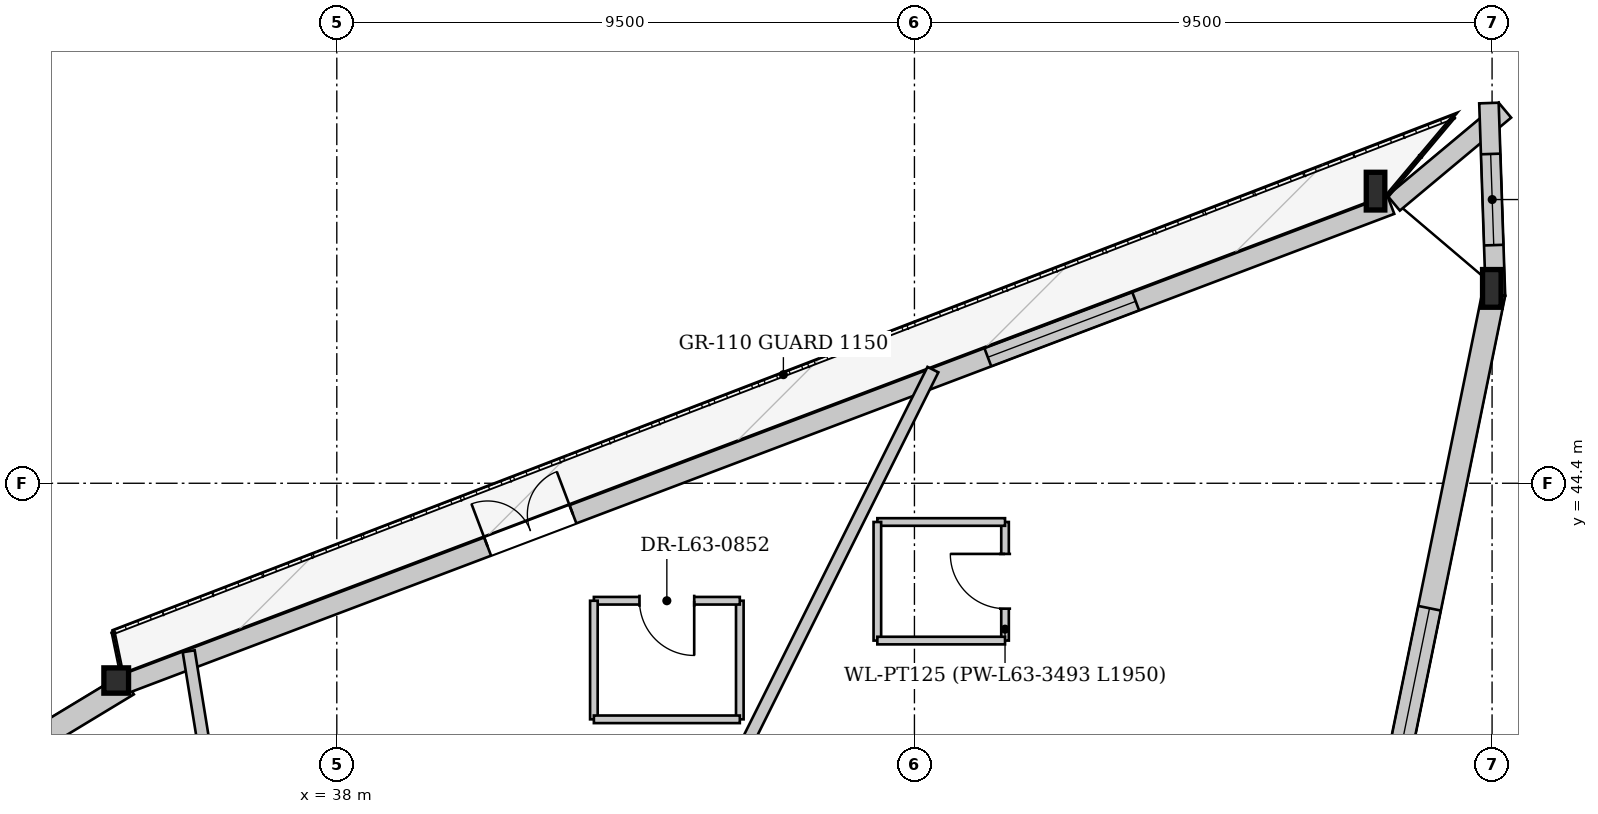
"""IFC4 building model, lengths in metres.
Left out: names, types, materials, properties, quantities, classifications, styles, units other than length and angle.
Written with IfcOpenShell. Run it as: python <this file> out.ifc"""

import sys

from ifc_helpers import new_model, si_unit, direction, frame, frame_2d, origin, origin_2d, place, context, subcontext, project, spatial, rectangle, i_section, extrude, source, transform, mapped, element, fill, save


model = new_model("IFC4")
c1 = context("Model", 3, precision=1e-05, world=origin(), true_north=direction((0.0, 1.0)))
c2 = subcontext(c1, "Body", "Model", "MODEL_VIEW")
j1 = project(units=[si_unit("LENGTHUNIT", "METRE"), si_unit("PLANEANGLEUNIT", "RADIAN")], contexts=[c1])
p1 = place(None, origin())
s1 = spatial("IfcSite", under=j1, at=p1, CompositionType="ELEMENT")
p2 = place(p1, origin())
s2 = spatial("IfcBuilding", under=s1, at=p2, CompositionType="ELEMENT")
p3 = place(p2, frame((0.0, 0.0, 238.1)))
s3 = spatial("IfcBuildingStorey", under=s2, at=p3, CompositionType="ELEMENT", Elevation=238.1)
m1 = source(origin(), c2, "Body", "SweptSolid", [
    extrude(i_section(OverallWidth=0.305, OverallDepth=0.62, WebThickness=0.021, FlangeThickness=0.04, at=origin_2d()), origin(), (0.0, 0.0, 1.0), 3.471),
])
p4 = place(p3, frame((57.216, 47.483, 0.0), z_axis=(-0.126666375705, 0.069768486785, 0.989488750577), x_axis=(-0.482460084866, -0.875917956495, 0.0)))
e1 = element("IfcColumn", 1, at=p4, inside=s3, PredefinedType="COLUMN", context=c2, shape_type="MappedRepresentation", body=[
    mapped(m1, transform((0.0, 0.0, 0.0), x_axis=(1.0, 0.0, 0.0), y_axis=(0.0, 1.0, 0.0), z_axis=(0.0, 0.0, 1.0), scale=1.0)),
])
m2 = source(origin(), c2, "Body", "SweptSolid", [
    extrude(i_section(OverallWidth=0.305, OverallDepth=0.62, WebThickness=0.021, FlangeThickness=0.04, at=origin_2d()), origin(), (0.0, 0.0, 1.0), 3.46),
])
p5 = place(p3, frame((55.278, 49.129, 0.0), z_axis=(-0.112543477187, 0.043112266183, 0.992711084983), x_axis=(-0.357723309734, -0.933827625246, 0.0)))
e2 = element("IfcColumn", 2, at=p5, inside=s3, PredefinedType="COLUMN", context=c2, shape_type="MappedRepresentation", body=[
    mapped(m2, transform((0.0, 0.0, 0.0), x_axis=(1.0, 0.0, 0.0), y_axis=(0.0, 1.0, 0.0), z_axis=(0.0, 0.0, 1.0), scale=1.0)),
])
m3 = source(origin(), c2, "Body", "SweptSolid", [
    extrude(i_section(OverallWidth=0.406, OverallDepth=0.416, WebThickness=0.027, FlangeThickness=0.042, at=origin_2d()), origin(), (0.0, 0.0, 1.0), 3.445),
])
p6 = place(p3, frame((34.465, 41.253, 0.0), z_axis=(-0.054066700831, -0.05647596404, 0.99693894364), x_axis=(0.722346539957, -0.691531254689, 0.0)))
e3 = element("IfcColumn", 3, at=p6, inside=s3, PredefinedType="COLUMN", context=c2, shape_type="MappedRepresentation", body=[
    mapped(m3, transform((0.0, 0.0, 0.0), x_axis=(1.0, 0.0, 0.0), y_axis=(0.0, 1.0, 0.0), z_axis=(0.0, 0.0, 1.0), scale=1.0)),
])
p7 = place(p3, frame((15.525, 29.57, 0.0), z_axis=(0.0, 0.0, 1.0), x_axis=(0.855554684799, 0.517712450418, 0.0)))
e4 = element("IfcWall", 4, at=p7, inside=s3, PredefinedType="SOLIDWALL", context=c2, shape_type="SweptSolid", body=[
    extrude(rectangle(XDim=22.253, YDim=0.38, at=frame_2d((11.126, 0.0))), origin(), (0.0, 0.0, 1.0), 2.872),
])
p8 = place(p7, frame((5.131, 0.0, 0.502)))
e5 = element("IfcOpeningElement", 5, at=p8, cuts=e4, PredefinedType="OPENING", context=c2, shape_type="SweptSolid", body=[
    extrude(rectangle(XDim=2.2, YDim=2.25, at=frame_2d((1.1, 1.125))), frame((0.0, 0.2, 0.0), z_axis=(0.0, -1.0, 0.0), x_axis=(1.0, 0.0, 0.0)), (0.0, 0.0, 1.0), 0.4),
])
p9 = place(p7, frame((14.922, 0.0, 0.502)))
e6 = element("IfcOpeningElement", 6, at=p9, cuts=e4, PredefinedType="OPENING", context=c2, shape_type="SweptSolid", body=[
    extrude(rectangle(XDim=2.2, YDim=2.25, at=frame_2d((1.1, 1.125))), frame((0.0, 0.2, 0.0), z_axis=(0.0, -1.0, 0.0), x_axis=(1.0, 0.0, 0.0)), (0.0, 0.0, 1.0), 0.4),
])
p10 = place(p3, frame((34.522, 41.104, 0.0), z_axis=(0.0, 0.0, 1.0), x_axis=(0.935273105542, 0.353926854095, 0.0)))
e7 = element("IfcWall", 7, at=p10, inside=s3, PredefinedType="SOLIDWALL", context=c2, shape_type="SweptSolid", body=[
    extrude(rectangle(XDim=22.253, YDim=0.32, at=frame_2d((11.126, 0.0))), origin(), (0.0, 0.0, 1.0), 2.872),
])
p11 = place(p10, frame((6.371, 0.0, 0.0)))
e8 = element("IfcOpeningElement", 8, at=p11, cuts=e7, PredefinedType="OPENING", context=c2, shape_type="SweptSolid", body=[
    extrude(rectangle(XDim=1.5, YDim=2.3, at=frame_2d((0.75, 1.15))), frame((0.0, 0.17, 0.0), z_axis=(0.0, -1.0, 0.0), x_axis=(1.0, 0.0, 0.0)), (0.0, 0.0, 1.0), 0.34),
])
p12 = place(p10, frame((15.167, 0.0, 0.402)))
e9 = element("IfcOpeningElement", 9, at=p12, cuts=e7, PredefinedType="OPENING", context=c2, shape_type="SweptSolid", body=[
    extrude(rectangle(XDim=2.6, YDim=2.35, at=frame_2d((1.3, 1.175))), frame((0.0, 0.17, 0.0), z_axis=(0.0, -1.0, 0.0), x_axis=(1.0, 0.0, 0.0)), (0.0, 0.0, 1.0), 0.34),
])
p13 = place(p3, frame((55.381, 49.007, 0.0), z_axis=(0.0, 0.0, 1.0), x_axis=(0.767448666807, 0.641110399086, 0.0)))
e10 = element("IfcWall", 10, at=p13, inside=s3, PredefinedType="SOLIDWALL", context=c2, shape_type="SweptSolid", body=[
    extrude(rectangle(XDim=2.385, YDim=0.32, at=frame_2d((1.192, 0.0))), origin(), (0.0, 0.0, 1.0), 2.872),
])
p14 = place(p3, frame((56.948, 50.653, 0.0), z_axis=(0.0, 0.0, 1.0), x_axis=(0.033816390911, -0.999428062296, 0.0)))
e11 = element("IfcWall", 11, at=p14, inside=s3, PredefinedType="SOLIDWALL", context=c2, shape_type="SweptSolid", body=[
    extrude(rectangle(XDim=3.177, YDim=0.32, at=frame_2d((1.588, 0.0))), origin(), (0.0, 0.0, 1.0), 2.872),
])
p15 = place(p14, frame((0.838, 0.0, 0.452)))
e12 = element("IfcOpeningElement", 12, at=p15, cuts=e11, PredefinedType="OPENING", context=c2, shape_type="SweptSolid", body=[
    extrude(rectangle(XDim=1.5, YDim=2.3, at=frame_2d((0.75, 1.15))), frame((0.0, 0.17, 0.0), z_axis=(0.0, -1.0, 0.0), x_axis=(1.0, 0.0, 0.0)), (0.0, 0.0, 1.0), 0.34),
])
p16 = place(p3, frame((57.03, 47.521, 0.0), z_axis=(0.0, 0.0, 1.0), x_axis=(-0.200236926918, -0.979747504768, 0.0)))
e13 = element("IfcWall", 13, at=p16, inside=s3, PredefinedType="SOLIDWALL", context=c2, shape_type="SweptSolid", body=[
    extrude(rectangle(XDim=22.8, YDim=0.38, at=frame_2d((11.4, 0.0))), origin(), (0.0, 0.0, 1.0), 2.872),
])
p17 = place(p16, frame((5.284, 0.0, 0.502)))
e14 = element("IfcOpeningElement", 14, at=p17, cuts=e13, PredefinedType="OPENING", context=c2, shape_type="SweptSolid", body=[
    extrude(rectangle(XDim=2.2, YDim=2.25, at=frame_2d((1.1, 1.125))), frame((0.0, 0.2, 0.0), z_axis=(0.0, -1.0, 0.0), x_axis=(1.0, 0.0, 0.0)), (0.0, 0.0, 1.0), 0.4),
])
p18 = place(p16, frame((15.316, 0.0, 0.502)))
e15 = element("IfcOpeningElement", 15, at=p18, cuts=e13, PredefinedType="OPENING", context=c2, shape_type="SweptSolid", body=[
    extrude(rectangle(XDim=2.2, YDim=2.25, at=frame_2d((1.1, 1.125))), frame((0.0, 0.2, 0.0), z_axis=(0.0, -1.0, 0.0), x_axis=(1.0, 0.0, 0.0)), (0.0, 0.0, 1.0), 0.4),
])
p19 = place(p3, frame((36.478, 36.0, 0.0), z_axis=(0.0, 0.0, 1.0), x_axis=(-0.159891020991, 0.987134672376, 0.0)))
e16 = element("IfcWall", 16, at=p19, inside=s3, PredefinedType="PARTITIONING", context=c2, shape_type="SweptSolid", body=[
    extrude(rectangle(XDim=5.711, YDim=0.2, at=frame_2d((2.855, 0.0))), origin(), (0.0, 0.0, 1.0), 3.38),
])
p20 = place(p3, frame((41.763, 34.15, 0.0), z_axis=(0.0, 0.0, 1.0), x_axis=(0.446117078005, 0.894974610094, 0.0)))
e17 = element("IfcWall", 17, at=p20, inside=s3, PredefinedType="PARTITIONING", context=c2, shape_type="SweptSolid", body=[
    extrude(rectangle(XDim=13.541, YDim=0.2, at=frame_2d((6.771, 0.0))), origin(), (0.0, 0.0, 1.0), 3.38),
])
p21 = place(p3, frame((48.99, 41.813, 0.0), z_axis=(0.0, 0.0, 1.0), x_axis=(0.0, 1.0, 0.0)))
e18 = element("IfcWall", 18, at=p21, inside=s3, PredefinedType="PARTITIONING", context=c2, shape_type="SweptSolid", body=[
    extrude(rectangle(XDim=1.95, YDim=0.125, at=frame_2d((0.975, 0.0))), origin(), (0.0, 0.0, 1.0), 3.38),
])
p22 = place(p21, frame((0.525, 0.0, 0.0)))
e19 = element("IfcOpeningElement", 19, at=p22, cuts=e18, PredefinedType="OPENING", context=c2, shape_type="SweptSolid", body=[
    extrude(rectangle(XDim=0.9, YDim=2.1, at=frame_2d((0.45, 1.05))), frame((0.0, 0.073, 0.0), z_axis=(0.0, -1.0, 0.0), x_axis=(1.0, 0.0, 0.0)), (0.0, 0.0, 1.0), 0.145),
])
p23 = place(p3, frame((48.99, 43.763, 0.0), z_axis=(0.0, 0.0, 1.0), x_axis=(-1.0, 0.0, 0.0)))
e20 = element("IfcWall", 20, at=p23, inside=s3, PredefinedType="PARTITIONING", context=c2, shape_type="SweptSolid", body=[
    extrude(rectangle(XDim=2.1, YDim=0.125, at=frame_2d((1.05, 0.0))), origin(), (0.0, 0.0, 1.0), 3.38),
])
p24 = place(p3, frame((46.89, 43.763, 0.0), z_axis=(0.0, 0.0, 1.0), x_axis=(0.0, -1.0, 0.0)))
e21 = element("IfcWall", 21, at=p24, inside=s3, PredefinedType="PARTITIONING", context=c2, shape_type="SweptSolid", body=[
    extrude(rectangle(XDim=1.95, YDim=0.125, at=frame_2d((0.975, 0.0))), origin(), (0.0, 0.0, 1.0), 3.38),
])
p25 = place(p3, frame((46.89, 41.813, 0.0), z_axis=(0.0, 0.0, 1.0), x_axis=(1.0, 0.0, 0.0)))
e22 = element("IfcWall", 22, at=p25, inside=s3, PredefinedType="PARTITIONING", context=c2, shape_type="SweptSolid", body=[
    extrude(rectangle(XDim=2.1, YDim=0.125, at=frame_2d((1.05, 0.0))), origin(), (0.0, 0.0, 1.0), 3.38),
])
p26 = place(p3, frame((44.628, 40.518, 0.0), z_axis=(0.0, 0.0, 1.0), x_axis=(0.0, 1.0, 0.0)))
e23 = element("IfcWall", 23, at=p26, inside=s3, PredefinedType="PARTITIONING", context=c2, shape_type="SweptSolid", body=[
    extrude(rectangle(XDim=1.95, YDim=0.125, at=frame_2d((0.975, 0.0))), origin(), (0.0, 0.0, 1.0), 3.38),
])
p27 = place(p3, frame((44.628, 42.468, 0.0), z_axis=(0.0, 0.0, 1.0), x_axis=(-1.0, 0.0, 0.0)))
e24 = element("IfcWall", 24, at=p27, inside=s3, PredefinedType="PARTITIONING", context=c2, shape_type="SweptSolid", body=[
    extrude(rectangle(XDim=2.4, YDim=0.125, at=frame_2d((1.2, 0.0))), origin(), (0.0, 0.0, 1.0), 3.38),
])
p28 = place(p27, frame((0.75, 0.0, 0.0)))
e25 = element("IfcOpeningElement", 25, at=p28, cuts=e24, PredefinedType="OPENING", context=c2, shape_type="SweptSolid", body=[
    extrude(rectangle(XDim=0.9, YDim=2.1, at=frame_2d((0.45, 1.05))), frame((0.0, 0.073, 0.0), z_axis=(0.0, -1.0, 0.0), x_axis=(1.0, 0.0, 0.0)), (0.0, 0.0, 1.0), 0.145),
])
p29 = place(p3, frame((42.228, 42.468, 0.0), z_axis=(0.0, 0.0, 1.0), x_axis=(0.0, -1.0, 0.0)))
e26 = element("IfcWall", 26, at=p29, inside=s3, PredefinedType="PARTITIONING", context=c2, shape_type="SweptSolid", body=[
    extrude(rectangle(XDim=1.95, YDim=0.125, at=frame_2d((0.975, 0.0))), origin(), (0.0, 0.0, 1.0), 3.38),
])
p30 = place(p3, frame((42.228, 40.518, 0.0), z_axis=(0.0, 0.0, 1.0), x_axis=(1.0, 0.0, 0.0)))
e27 = element("IfcWall", 27, at=p30, inside=s3, PredefinedType="PARTITIONING", context=c2, shape_type="SweptSolid", body=[
    extrude(rectangle(XDim=2.4, YDim=0.125, at=frame_2d((1.2, 0.0))), origin(), (0.0, 0.0, 1.0), 3.005),
])
m4 = source(origin(), c2, "Body", "SweptSolid", [
    extrude(rectangle(XDim=1.5, YDim=2.3, at=frame_2d((0.75, 1.15))), frame((0.0, 0.025, 0.0), z_axis=(0.0, -1.0, 0.0), x_axis=(1.0, 0.0, 0.0)), (0.0, 0.0, 1.0), 0.05),
])
p31 = place(p11, origin())
e28 = element("IfcDoor", 28, at=p31, inside=s3, OperationType="DOUBLE_DOOR_SINGLE_SWING", PredefinedType="DOOR", context=c2, shape_type="MappedRepresentation", body=[
    mapped(m4, transform((0.0, 0.0, 0.0), x_axis=(1.0, 0.0, 0.0), y_axis=(0.0, 1.0, 0.0), z_axis=(0.0, 0.0, 1.0), scale=1.0)),
])
fill(e8, e28)
m5 = source(origin(), c2, "Body", "SweptSolid", [
    extrude(rectangle(XDim=2.6, YDim=2.35, at=frame_2d((1.3, 1.175))), frame((0.0, 0.03, 0.0), z_axis=(0.0, -1.0, 0.0), x_axis=(1.0, 0.0, 0.0)), (0.0, 0.0, 1.0), 0.06),
])
p32 = place(p12, origin())
e29 = element("IfcWindow", 29, at=p32, inside=s3, PartitioningType="SINGLE_PANEL", PredefinedType="WINDOW", context=c2, shape_type="MappedRepresentation", body=[
    mapped(m5, transform((0.0, 0.0, 0.0), x_axis=(1.0, 0.0, 0.0), y_axis=(0.0, 1.0, 0.0), z_axis=(0.0, 0.0, 1.0), scale=1.0)),
])
fill(e9, e29)
m6 = source(origin(), c2, "Body", "SweptSolid", [
    extrude(rectangle(XDim=1.5, YDim=2.3, at=frame_2d((0.75, 1.15))), frame((0.0, 0.03, 0.0), z_axis=(0.0, -1.0, 0.0), x_axis=(1.0, 0.0, 0.0)), (0.0, 0.0, 1.0), 0.06),
])
p33 = place(p15, origin())
e30 = element("IfcWindow", 30, at=p33, inside=s3, PartitioningType="SINGLE_PANEL", PredefinedType="WINDOW", context=c2, shape_type="MappedRepresentation", body=[
    mapped(m6, transform((0.0, 0.0, 0.0), x_axis=(1.0, 0.0, 0.0), y_axis=(0.0, 1.0, 0.0), z_axis=(0.0, 0.0, 1.0), scale=1.0)),
])
fill(e12, e30)
m7 = source(origin(), c2, "Body", "SweptSolid", [
    extrude(rectangle(XDim=2.2, YDim=2.25, at=frame_2d((1.1, 1.125))), frame((0.0, 0.03, 0.0), z_axis=(0.0, -1.0, 0.0), x_axis=(1.0, 0.0, 0.0)), (0.0, 0.0, 1.0), 0.06),
])
p34 = place(p17, origin())
e31 = element("IfcWindow", 31, at=p34, inside=s3, PartitioningType="SINGLE_PANEL", PredefinedType="WINDOW", context=c2, shape_type="MappedRepresentation", body=[
    mapped(m7, transform((0.0, 0.0, 0.0), x_axis=(1.0, 0.0, 0.0), y_axis=(0.0, 1.0, 0.0), z_axis=(0.0, 0.0, 1.0), scale=1.0)),
])
fill(e14, e31)
m8 = source(origin(), c2, "Body", "SweptSolid", [
    extrude(rectangle(XDim=0.9, YDim=2.1, at=frame_2d((0.45, 1.05))), frame((0.0, 0.025, 0.0), z_axis=(0.0, -1.0, 0.0), x_axis=(1.0, 0.0, 0.0)), (0.0, 0.0, 1.0), 0.05),
])
p35 = place(p22, origin())
e32 = element("IfcDoor", 32, at=p35, inside=s3, OperationType="SINGLE_SWING_RIGHT", PredefinedType="DOOR", context=c2, shape_type="MappedRepresentation", body=[
    mapped(m8, transform((0.0, 0.0, 0.0), x_axis=(1.0, 0.0, 0.0), y_axis=(0.0, 1.0, 0.0), z_axis=(0.0, 0.0, 1.0), scale=1.0)),
])
fill(e19, e32)
p36 = place(p28, origin())
e33 = element("IfcDoor", 33, at=p36, inside=s3, OperationType="SINGLE_SWING_LEFT", PredefinedType="DOOR", context=c2, shape_type="MappedRepresentation", body=[
    mapped(m8, transform((0.0, 0.0, 0.0), x_axis=(1.0, 0.0, 0.0), y_axis=(0.0, 1.0, 0.0), z_axis=(0.0, 0.0, 1.0), scale=1.0)),
])
fill(e25, e33)
save(model, sys.argv[1])
